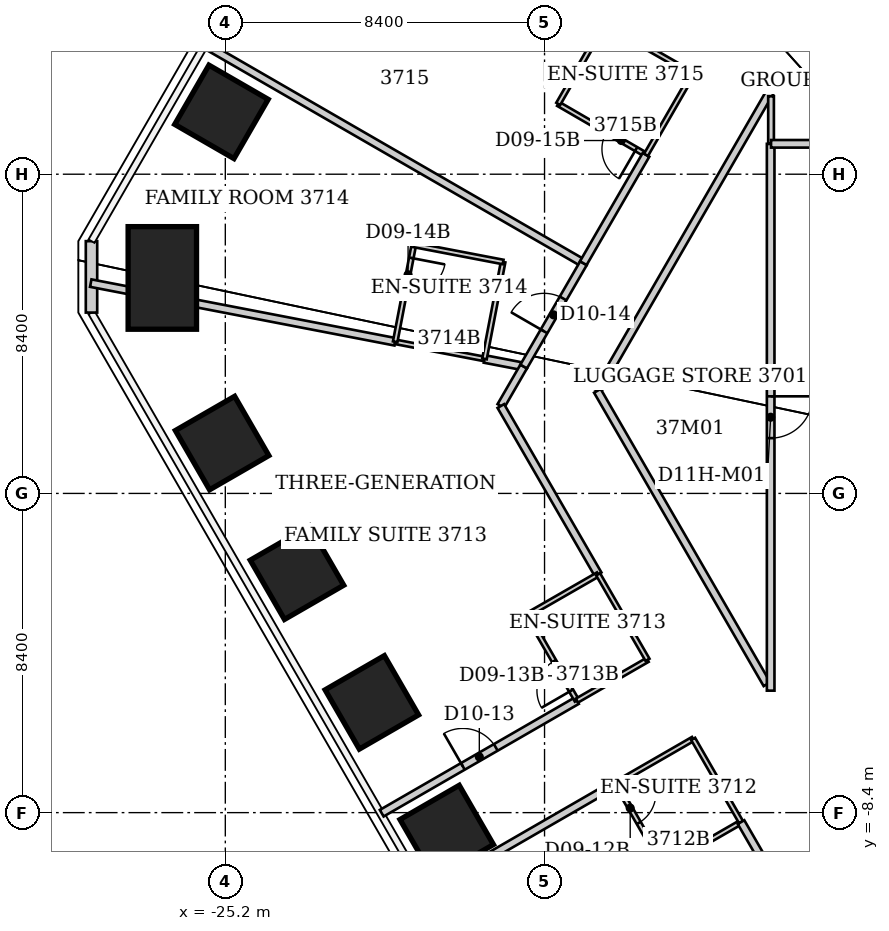
"""IFC4 building model, lengths in metres.
Left out: names, types, materials, properties, quantities, classifications, styles, units other than length and angle.
Written with IfcOpenShell. Run it as: python <this file> out.ifc"""

import sys

from ifc_helpers import new_model, si_unit, direction, frame, frame_2d, origin, origin_2d, place, context, subcontext, project, spatial, rectangle, extrude, element, fill, save


model = new_model("IFC4")
c1 = context("Model", 3, precision=1e-05, world=origin(), true_north=direction((0.0, 1.0)))
c2 = subcontext(c1, "Body", "Model", "MODEL_VIEW")
j1 = project(units=[si_unit("LENGTHUNIT", "METRE"), si_unit("PLANEANGLEUNIT", "RADIAN")], contexts=[c1])
p1 = place(None, origin())
s1 = spatial("IfcSite", under=j1, at=p1, CompositionType="ELEMENT")
p2 = place(p1, origin())
s2 = spatial("IfcBuilding", under=s1, at=p2, CompositionType="ELEMENT")
p3 = place(p2, frame((0.0, 0.0, 150.0)))
s3 = spatial("IfcBuildingStorey", under=s2, at=p3, CompositionType="ELEMENT", Elevation=150.0)
p4 = place(p3, frame((-19.374, -8.911, -0.046), z_axis=(0.043112264699, 0.019844321839, 0.998873132847), x_axis=(-0.864807493733, -0.499874783842, 0.047256737739)))
e1 = element("IfcColumn", 1, at=p4, inside=s3, PredefinedType="COLUMN", context=c2, shape_type="SweptSolid", body=[
    extrude(rectangle(XDim=1.8, YDim=1.8, at=origin_2d()), origin(), (0.0, 0.0, 1.0), 3.851),
])
p5 = place(p3, frame((-21.344, -5.499, -0.054), z_axis=(0.047510469933, 0.012273010875, 0.998795338621), x_axis=(-0.864419091597, -0.500544969808, 0.047269094371)))
e2 = element("IfcColumn", 2, at=p5, inside=s3, PredefinedType="COLUMN", context=c2, shape_type="SweptSolid", body=[
    extrude(rectangle(XDim=1.8, YDim=1.8, at=origin_2d()), origin(), (0.0, 0.0, 1.0), 3.859),
])
p6 = place(p3, frame((-23.314, -2.087, -0.062), z_axis=(0.051888980404, 0.004671270742, 0.9986419343), x_axis=(-0.864279894758, -0.500787073665, 0.047250083245)))
e3 = element("IfcColumn", 3, at=p6, inside=s3, PredefinedType="COLUMN", context=c2, shape_type="SweptSolid", body=[
    extrude(rectangle(XDim=1.8, YDim=1.8, at=origin_2d()), origin(), (0.0, 0.0, 1.0), 3.868),
])
p7 = place(p3, frame((-25.284, 1.325, -0.07), z_axis=(0.05624416487, -0.002960219204, 0.998412655679), x_axis=(-0.864437776769, -0.500518005639, 0.047212880923)))
e4 = element("IfcColumn", 4, at=p7, inside=s3, PredefinedType="COLUMN", context=c2, shape_type="SweptSolid", body=[
    extrude(rectangle(XDim=1.8, YDim=1.8, at=origin_2d()), origin(), (0.0, 0.0, 1.0), 3.876),
])
p8 = place(p3, frame((-26.857, 5.67, -0.071), z_axis=(0.060174697358, -0.012714737308, 0.998106878672), x_axis=(-0.998187848607, -0.000609086615, 0.060171819876)))
e5 = element("IfcColumn", 5, at=p8, inside=s3, PredefinedType="COLUMN", context=c2, shape_type="SweptSolid", body=[
    extrude(rectangle(XDim=1.8, YDim=2.7, at=origin_2d()), origin(), (0.0, 0.0, 1.0), 3.879),
])
p9 = place(p3, frame((-25.302, 10.041, -0.061), z_axis=(0.055421674634, -0.021966677417, 0.998221369769), x_axis=(-0.864472305627, 0.499208205688, 0.058981354491)))
e6 = element("IfcColumn", 6, at=p9, inside=s3, PredefinedType="COLUMN", context=c2, shape_type="SweptSolid", body=[
    extrude(rectangle(XDim=1.8, YDim=1.8, at=origin_2d()), origin(), (0.0, 0.0, 1.0), 3.868),
])
p10 = place(p3, frame((-28.721, 4.759, 0.0), z_axis=(0.0, 0.0, 1.0), x_axis=(0.0, 1.0, 0.0)))
e7 = element("IfcWall", 7, at=p10, inside=s3, PredefinedType="SOLIDWALL", context=c2, shape_type="SweptSolid", body=[
    extrude(rectangle(XDim=1.88, YDim=0.3, at=frame_2d((0.94, 0.0))), origin(), (0.0, 0.0, 1.0), 3.64),
])
p11 = place(p3, frame((-28.74, 5.534, 0.0), z_axis=(0.0, 0.0, 1.0), x_axis=(0.981916471091, -0.189314668743, 0.0)))
e8 = element("IfcWall", 8, at=p11, inside=s3, PredefinedType="PARTITIONING", context=c2, shape_type="SweptSolid", body=[
    extrude(rectangle(XDim=8.158, YDim=0.2, at=frame_2d((4.079, 0.0))), origin(), (0.0, 0.0, 1.0), 3.64),
])
p12 = place(p3, frame((-25.714, 11.795, 0.0), z_axis=(0.0, 0.0, 1.0), x_axis=(0.866045467449, -0.499965247104, 0.0)))
e9 = element("IfcWall", 9, at=p12, inside=s3, PredefinedType="PARTITIONING", context=c2, shape_type="SweptSolid", body=[
    extrude(rectangle(XDim=11.461, YDim=0.2, at=frame_2d((5.73, 0.0))), origin(), (0.0, 0.0, 1.0), 3.64),
])
p13 = place(p3, frame((-21.084, -8.415, 0.0), z_axis=(0.0, 0.0, 1.0), x_axis=(0.866185586049, 0.49972245349, 0.0)))
e10 = element("IfcWall", 10, at=p13, inside=s3, PredefinedType="PARTITIONING", context=c2, shape_type="SweptSolid", body=[
    extrude(rectangle(XDim=5.928, YDim=0.2, at=frame_2d((2.964, 0.0))), origin(), (0.0, 0.0, 1.0), 3.64),
])
p14 = place(p13, frame((2.464, 0.0, 0.0)))
e11 = element("IfcOpeningElement", 11, at=p14, cuts=e10, PredefinedType="OPENING", context=c2, shape_type="SweptSolid", body=[
    extrude(rectangle(XDim=1.0, YDim=2.13, at=frame_2d((0.5, 1.065))), frame((0.0, 0.1, 0.0), z_axis=(0.0, -1.0, 0.0), x_axis=(1.0, 0.0, 0.0)), (0.0, 0.0, 1.0), 0.2),
])
p15 = place(p3, frame((-20.73, 3.99, 0.0), z_axis=(0.0, 0.0, 1.0), x_axis=(0.982021000234, -0.188771701001, 0.0)))
e12 = element("IfcWall", 12, at=p15, inside=s3, PredefinedType="PARTITIONING", context=c2, shape_type="SweptSolid", body=[
    extrude(rectangle(XDim=2.393, YDim=0.12, at=frame_2d((1.196, 0.0))), origin(), (0.0, 0.0, 1.0), 3.64),
])
p16 = place(p3, frame((-20.24, 6.54, 0.0), z_axis=(0.0, 0.0, 1.0), x_axis=(-0.188697442844, -0.982035271802, 0.0)))
e13 = element("IfcWall", 13, at=p16, inside=s3, PredefinedType="PARTITIONING", context=c2, shape_type="SweptSolid", body=[
    extrude(rectangle(XDim=2.597, YDim=0.12, at=frame_2d((1.298, 0.0))), origin(), (0.0, 0.0, 1.0), 3.64),
])
p17 = place(p16, frame((0.35, 0.0, 0.0)))
e14 = element("IfcOpeningElement", 14, at=p17, cuts=e13, PredefinedType="OPENING", context=c2, shape_type="SweptSolid", body=[
    extrude(rectangle(XDim=0.9, YDim=2.03, at=frame_2d((0.45, 1.015))), frame((0.0, 0.06, 0.0), z_axis=(0.0, -1.0, 0.0), x_axis=(1.0, 0.0, 0.0)), (0.0, 0.0, 1.0), 0.12),
])
p18 = place(p3, frame((-19.884, -10.495, 0.0), z_axis=(0.0, 0.0, 1.0), x_axis=(0.86608558139, 0.499895754841, 0.0)))
e15 = element("IfcWall", 15, at=p18, inside=s3, PredefinedType="PARTITIONING", context=c2, shape_type="SweptSolid", body=[
    extrude(rectangle(XDim=5.732, YDim=0.2, at=frame_2d((2.866, 0.0))), origin(), (0.0, 0.0, 1.0), 3.64),
])
p19 = place(p3, frame((-18.38, 3.538, 0.0), z_axis=(0.0, 0.0, 1.0), x_axis=(0.981957872109, -0.189099808045, 0.0)))
e16 = element("IfcWall", 16, at=p19, inside=s3, PredefinedType="PARTITIONING", context=c2, shape_type="SweptSolid", body=[
    extrude(rectangle(XDim=1.004, YDim=0.2, at=frame_2d((0.502, 0.0))), origin(), (0.0, 0.0, 1.0), 3.64),
])
p20 = place(p3, frame((-18.38, 3.54, 0.0), z_axis=(0.0, 0.0, 1.0), x_axis=(0.188697442844, 0.982035271802, 0.0)))
e17 = element("IfcWall", 17, at=p20, inside=s3, PredefinedType="PARTITIONING", context=c2, shape_type="SweptSolid", body=[
    extrude(rectangle(XDim=2.597, YDim=0.12, at=frame_2d((1.298, 0.0))), origin(), (0.0, 0.0, 1.0), 3.64),
])
p21 = place(p3, frame((-17.95, 2.3, 0.0), z_axis=(0.0, 0.0, 1.0), x_axis=(0.500795801589, 0.865565459749, 0.0)))
e18 = element("IfcWall", 18, at=p21, inside=s3, PredefinedType="PARTITIONING", context=c2, shape_type="SweptSolid", body=[
    extrude(rectangle(XDim=1.201, YDim=0.2, at=frame_2d((0.6, 0.0))), origin(), (0.0, 0.0, 1.0), 3.64),
])
p22 = place(p3, frame((-17.95, 2.3, 0.0), z_axis=(0.0, 0.0, 1.0), x_axis=(0.500336423072, -0.865831082687, 0.0)))
e19 = element("IfcWall", 19, at=p22, inside=s3, PredefinedType="PARTITIONING", context=c2, shape_type="SweptSolid", body=[
    extrude(rectangle(XDim=5.117, YDim=0.2, at=frame_2d((2.558, 0.0))), origin(), (0.0, 0.0, 1.0), 3.64),
])
p23 = place(p3, frame((-17.89, 6.09, 0.0), z_axis=(0.0, 0.0, 1.0), x_axis=(-0.982160404505, 0.18804504732, 0.0)))
e20 = element("IfcWall", 20, at=p23, inside=s3, PredefinedType="PARTITIONING", context=c2, shape_type="SweptSolid", body=[
    extrude(rectangle(XDim=2.393, YDim=0.12, at=frame_2d((1.196, 0.0))), origin(), (0.0, 0.0, 1.0), 3.64),
])
p24 = place(p3, frame((-17.349, 3.339, 0.0), z_axis=(0.0, 0.0, 1.0), x_axis=(0.500803353914, 0.865561090108, 0.0)))
e21 = element("IfcWall", 21, at=p24, inside=s3, PredefinedType="PARTITIONING", context=c2, shape_type="SweptSolid", body=[
    extrude(rectangle(XDim=3.14, YDim=0.2, at=frame_2d((1.57, 0.0))), origin(), (0.0, 0.0, 1.0), 3.64),
])
p25 = place(p24, frame((1.07, 0.0, 0.0)))
e22 = element("IfcOpeningElement", 22, at=p25, cuts=e21, PredefinedType="OPENING", context=c2, shape_type="SweptSolid", body=[
    extrude(rectangle(XDim=1.0, YDim=2.13, at=frame_2d((0.5, 1.065))), frame((0.0, 0.1, 0.0), z_axis=(0.0, -1.0, 0.0), x_axis=(1.0, 0.0, 0.0)), (0.0, 0.0, 1.0), 0.2),
])
p26 = place(p3, frame((-17.25, -3.2, 0.0), z_axis=(0.0, 0.0, 1.0), x_axis=(0.500291685314, -0.865856933682, 0.0)))
e23 = element("IfcWall", 23, at=p26, inside=s3, PredefinedType="PARTITIONING", context=c2, shape_type="SweptSolid", body=[
    extrude(rectangle(XDim=2.599, YDim=0.12, at=frame_2d((1.299, 0.0))), origin(), (0.0, 0.0, 1.0), 3.64),
])
p27 = place(p26, frame((1.399, 0.0, 0.0)))
e24 = element("IfcOpeningElement", 24, at=p27, cuts=e23, PredefinedType="OPENING", context=c2, shape_type="SweptSolid", body=[
    extrude(rectangle(XDim=0.9, YDim=2.03, at=frame_2d((0.45, 1.015))), frame((0.0, 0.06, 0.0), z_axis=(0.0, -1.0, 0.0), x_axis=(1.0, 0.0, 0.0)), (0.0, 0.0, 1.0), 0.12),
])
p28 = place(p3, frame((-16.44, 10.25, 0.0), z_axis=(0.0, 0.0, 1.0), x_axis=(0.864966903181, -0.501828911485, 0.0)))
e25 = element("IfcWall", 25, at=p28, inside=s3, PredefinedType="PARTITIONING", context=c2, shape_type="SweptSolid", body=[
    extrude(rectangle(XDim=2.67, YDim=0.12, at=frame_2d((1.335, 0.0))), origin(), (0.0, 0.0, 1.0), 3.64),
])
p29 = place(p28, frame((1.47, 0.0, 0.0)))
e26 = element("IfcOpeningElement", 26, at=p29, cuts=e25, PredefinedType="OPENING", context=c2, shape_type="SweptSolid", body=[
    extrude(rectangle(XDim=0.9, YDim=2.03, at=frame_2d((0.45, 1.015))), frame((0.0, 0.06, 0.0), z_axis=(0.0, -1.0, 0.0), x_axis=(1.0, 0.0, 0.0)), (0.0, 0.0, 1.0), 0.12),
])
p30 = place(p3, frame((-15.949, -5.452, 0.0), z_axis=(0.0, 0.0, 1.0), x_axis=(0.866142018774, 0.499797962495, 0.0)))
e27 = element("IfcWall", 27, at=p30, inside=s3, PredefinedType="PARTITIONING", context=c2, shape_type="SweptSolid", body=[
    extrude(rectangle(XDim=2.146, YDim=0.12, at=frame_2d((1.073, 0.0))), origin(), (0.0, 0.0, 1.0), 3.64),
])
p31 = place(p3, frame((-15.78, 6.06, 0.0), z_axis=(0.0, 0.0, 1.0), x_axis=(0.501088872721, 0.865395829453, 0.0)))
e28 = element("IfcWall", 28, at=p31, inside=s3, PredefinedType="PARTITIONING", context=c2, shape_type="SweptSolid", body=[
    extrude(rectangle(XDim=3.293, YDim=0.2, at=frame_2d((1.646, 0.0))), origin(), (0.0, 0.0, 1.0), 3.64),
])
p32 = place(p3, frame((-15.41, 2.7, 0.0), z_axis=(0.0, 0.0, 1.0), x_axis=(0.500237524763, 0.865888225361, 0.0)))
e29 = element("IfcWall", 29, at=p32, inside=s3, PredefinedType="PARTITIONING", context=c2, shape_type="SweptSolid", body=[
    extrude(rectangle(XDim=9.135, YDim=0.2, at=frame_2d((4.568, 0.0))), origin(), (0.0, 0.0, 1.0), 3.64),
])
p33 = place(p3, frame((-15.39, -2.13, 0.0), z_axis=(0.0, 0.0, 1.0), x_axis=(-0.866804272416, -0.498648526841, 0.0)))
e30 = element("IfcWall", 30, at=p33, inside=s3, PredefinedType="PARTITIONING", context=c2, shape_type="SweptSolid", body=[
    extrude(rectangle(XDim=2.146, YDim=0.12, at=frame_2d((1.073, 0.0))), origin(), (0.0, 0.0, 1.0), 2.878),
])
p34 = place(p3, frame((-15.39, -2.13, 0.0), z_axis=(0.0, 0.0, 1.0), x_axis=(0.500180550803, -0.865921137632, 0.0)))
e31 = element("IfcWall", 31, at=p34, inside=s3, PredefinedType="PARTITIONING", context=c2, shape_type="SweptSolid", body=[
    extrude(rectangle(XDim=2.599, YDim=0.12, at=frame_2d((1.299, 0.0))), origin(), (0.0, 0.0, 1.0), 3.64),
])
p35 = place(p3, frame((-15.22, 12.37, 0.0), z_axis=(0.0, 0.0, 1.0), x_axis=(-0.498748634132, -0.866746675766, 0.0)))
e32 = element("IfcWall", 32, at=p35, inside=s3, PredefinedType="PARTITIONING", context=c2, shape_type="SweptSolid", body=[
    extrude(rectangle(XDim=2.446, YDim=0.12, at=frame_2d((1.223, 0.0))), origin(), (0.0, 0.0, 1.0), 3.64),
])
p36 = place(p3, frame((-15.22, 12.37, 0.0), z_axis=(0.0, 0.0, 1.0), x_axis=(0.867545659855, -0.497357545501, 0.0)))
e33 = element("IfcWall", 33, at=p36, inside=s3, PredefinedType="PARTITIONING", context=c2, shape_type="SweptSolid", body=[
    extrude(rectangle(XDim=2.674, YDim=0.12, at=frame_2d((1.337, 0.0))), origin(), (0.0, 0.0, 1.0), 3.64),
])
p37 = place(p3, frame((-14.92, -7.63, 0.0), z_axis=(0.0, 0.0, 1.0), x_axis=(0.498665353881, -0.866794592068, 0.0)))
e34 = element("IfcWall", 34, at=p37, inside=s3, PredefinedType="PARTITIONING", context=c2, shape_type="SweptSolid", body=[
    extrude(rectangle(XDim=2.527, YDim=0.12, at=frame_2d((1.263, 0.0))), origin(), (0.0, 0.0, 1.0), 3.64),
])
p38 = place(p37, frame((0.3, 0.0, 0.0)))
e35 = element("IfcOpeningElement", 35, at=p38, cuts=e34, PredefinedType="OPENING", context=c2, shape_type="SweptSolid", body=[
    extrude(rectangle(XDim=0.9, YDim=2.03, at=frame_2d((0.45, 1.015))), frame((0.0, 0.06, 0.0), z_axis=(0.0, -1.0, 0.0), x_axis=(1.0, 0.0, 0.0)), (0.0, 0.0, 1.0), 0.12),
])
p39 = place(p3, frame((-14.92, -7.63, 0.0), z_axis=(0.0, 0.0, 1.0), x_axis=(0.866390229467, 0.499367570316, 0.0)))
e36 = element("IfcWall", 36, at=p39, inside=s3, PredefinedType="PARTITIONING", context=c2, shape_type="SweptSolid", body=[
    extrude(rectangle(XDim=2.343, YDim=0.12, at=frame_2d((1.171, 0.0))), origin(), (0.0, 0.0, 1.0), 3.64),
])
p40 = place(p3, frame((-14.13, 8.91, 0.0), z_axis=(0.0, 0.0, 1.0), x_axis=(0.500046071023, 0.865998803033, 0.0)))
e37 = element("IfcWall", 37, at=p40, inside=s3, PredefinedType="PARTITIONING", context=c2, shape_type="SweptSolid", body=[
    extrude(rectangle(XDim=2.46, YDim=0.12, at=frame_2d((1.23, 0.0))), origin(), (0.0, 0.0, 1.0), 3.64),
])
p41 = place(p3, frame((-13.66, -9.82, 0.0), z_axis=(0.0, 0.0, 1.0), x_axis=(0.866345142729, 0.499445786517, 0.0)))
e38 = element("IfcWall", 38, at=p41, inside=s3, PredefinedType="PARTITIONING", context=c2, shape_type="SweptSolid", body=[
    extrude(rectangle(XDim=2.343, YDim=0.12, at=frame_2d((1.171, 0.0))), origin(), (0.0, 0.0, 1.0), 3.64),
])
p42 = place(p3, frame((-12.89, -6.46, 0.0), z_axis=(0.0, 0.0, 1.0), x_axis=(0.498707120669, -0.866770562372, 0.0)))
e39 = element("IfcWall", 39, at=p42, inside=s3, PredefinedType="PARTITIONING", context=c2, shape_type="SweptSolid", body=[
    extrude(rectangle(XDim=2.527, YDim=0.12, at=frame_2d((1.263, 0.0))), origin(), (0.0, 0.0, 1.0), 3.64),
])
p43 = place(p3, frame((-11.63, -8.65, 0.0), z_axis=(0.0, 0.0, 1.0), x_axis=(0.500367528775, -0.865813106939, 0.0)))
e40 = element("IfcWall", 40, at=p43, inside=s3, PredefinedType="PARTITIONING", context=c2, shape_type="SweptSolid", body=[
    extrude(rectangle(XDim=8.593, YDim=0.2, at=frame_2d((4.297, 0.0))), origin(), (0.0, 0.0, 1.0), 3.64),
])
p44 = place(p43, frame((3.797, 0.0, 0.0)))
e41 = element("IfcOpeningElement", 41, at=p44, cuts=e40, PredefinedType="OPENING", context=c2, shape_type="SweptSolid", body=[
    extrude(rectangle(XDim=1.0, YDim=2.13, at=frame_2d((0.5, 1.065))), frame((0.0, 0.1, 0.0), z_axis=(0.0, -1.0, 0.0), x_axis=(1.0, 0.0, 0.0)), (0.0, 0.0, 1.0), 0.2),
])
p45 = place(p3, frame((-10.948, -5.021, 0.0), z_axis=(0.0, 0.0, 1.0), x_axis=(-0.500384322182, 0.865803401538, 0.0)))
e42 = element("IfcWall", 42, at=p45, inside=s3, PredefinedType="PARTITIONING", context=c2, shape_type="SweptSolid", body=[
    extrude(rectangle(XDim=8.918, YDim=0.2, at=frame_2d((4.459, 0.0))), origin(), (0.0, 0.0, 1.0), 3.64),
])
p46 = place(p3, frame((-10.85, 9.2, 0.0), z_axis=(0.0, 0.0, 1.0), x_axis=(0.0, -1.0, 0.0)))
e43 = element("IfcWall", 43, at=p46, inside=s3, PredefinedType="PARTITIONING", context=c2, shape_type="SweptSolid", body=[
    extrude(rectangle(XDim=14.39, YDim=0.2, at=frame_2d((7.195, 0.0))), origin(), (0.0, 0.0, 1.0), 3.64),
])
p47 = place(p46, frame((6.645, 0.0, 0.0)))
e44 = element("IfcOpeningElement", 44, at=p47, cuts=e43, PredefinedType="OPENING", context=c2, shape_type="SweptSolid", body=[
    extrude(rectangle(XDim=1.1, YDim=2.2, at=frame_2d((0.55, 1.1))), frame((0.0, 0.1, 0.0), z_axis=(0.0, -1.0, 0.0), x_axis=(1.0, 0.0, 0.0)), (0.0, 0.0, 1.0), 0.2),
])
p48 = place(p3, frame((-10.84, 10.45, 0.0), z_axis=(0.0, 0.0, 1.0), x_axis=(0.0, -1.0, 0.0)))
e45 = element("IfcWall", 45, at=p48, inside=s3, PredefinedType="PARTITIONING", context=c2, shape_type="SweptSolid", body=[
    extrude(rectangle(XDim=1.25, YDim=0.15, at=frame_2d((0.625, 0.0))), origin(), (0.0, 0.0, 1.0), 3.64),
])
p49 = place(p3, frame((-10.84, 10.61, 0.0), z_axis=(0.0, 0.0, 1.0), x_axis=(0.501518373175, 0.865146994081, 0.0)))
e46 = element("IfcWall", 46, at=p49, inside=s3, PredefinedType="PARTITIONING", context=c2, shape_type="SweptSolid", body=[
    extrude(rectangle(XDim=0.439, YDim=0.2, at=frame_2d((0.22, 0.0))), origin(), (0.0, 0.0, 1.0), 3.64),
])
p50 = place(p3, frame((-10.62, 10.99, 0.0), z_axis=(0.0, 0.0, 1.0), x_axis=(1.0, 0.0, 0.0)))
e47 = element("IfcWall", 47, at=p50, inside=s3, PredefinedType="PARTITIONING", context=c2, shape_type="SweptSolid", body=[
    extrude(rectangle(XDim=4.35, YDim=0.2, at=frame_2d((2.175, 0.0))), origin(), (0.0, 0.0, 1.0), 3.64),
])
p51 = place(p3, frame((-6.27, 9.2, 0.0), z_axis=(0.0, 0.0, 1.0), x_axis=(-1.0, 0.0, 0.0)))
e48 = element("IfcWall", 48, at=p51, inside=s3, PredefinedType="PARTITIONING", context=c2, shape_type="SweptSolid", body=[
    extrude(rectangle(XDim=4.57, YDim=0.2, at=frame_2d((2.285, 0.0))), origin(), (0.0, 0.0, 1.0), 3.64),
])
p52 = place(p51, frame((1.735, 0.0, 0.0)))
e49 = element("IfcOpeningElement", 49, at=p52, cuts=e48, PredefinedType="OPENING", context=c2, shape_type="SweptSolid", body=[
    extrude(rectangle(XDim=1.1, YDim=2.2, at=frame_2d((0.55, 1.1))), frame((0.0, 0.1, 0.0), z_axis=(0.0, -1.0, 0.0), x_axis=(1.0, 0.0, 0.0)), (0.0, 0.0, 1.0), 0.2),
])
p53 = place(p38, origin())
e50 = element("IfcDoor", 50, at=p53, inside=s3, OperationType="SINGLE_SWING_LEFT", PredefinedType="DOOR", context=c2, shape_type="SweptSolid", body=[
    extrude(rectangle(XDim=0.9, YDim=2.03, at=frame_2d((0.45, 1.015))), frame((0.0, 0.025, 0.0), z_axis=(0.0, -1.0, 0.0), x_axis=(1.0, 0.0, 0.0)), (0.0, 0.0, 1.0), 0.05),
])
fill(e35, e50)
p54 = place(p14, origin())
e51 = element("IfcDoor", 51, at=p54, inside=s3, OperationType="SINGLE_SWING_LEFT", PredefinedType="DOOR", context=c2, shape_type="SweptSolid", body=[
    extrude(rectangle(XDim=1.0, YDim=2.13, at=frame_2d((0.5, 1.065))), frame((0.0, 0.025, 0.0), z_axis=(0.0, -1.0, 0.0), x_axis=(1.0, 0.0, 0.0)), (0.0, 0.0, 1.0), 0.05),
])
fill(e11, e51)
p55 = place(p27, origin())
e52 = element("IfcDoor", 52, at=p55, inside=s3, OperationType="SINGLE_SWING_RIGHT", PredefinedType="DOOR", context=c2, shape_type="SweptSolid", body=[
    extrude(rectangle(XDim=0.9, YDim=2.03, at=frame_2d((0.45, 1.015))), frame((0.0, 0.025, 0.0), z_axis=(0.0, -1.0, 0.0), x_axis=(1.0, 0.0, 0.0)), (0.0, 0.0, 1.0), 0.05),
])
fill(e24, e52)
p56 = place(p25, origin())
e53 = element("IfcDoor", 53, at=p56, inside=s3, OperationType="SINGLE_SWING_LEFT", PredefinedType="DOOR", context=c2, shape_type="SweptSolid", body=[
    extrude(rectangle(XDim=1.0, YDim=2.13, at=frame_2d((0.5, 1.065))), frame((0.0, 0.025, 0.0), z_axis=(0.0, -1.0, 0.0), x_axis=(1.0, 0.0, 0.0)), (0.0, 0.0, 1.0), 0.05),
])
fill(e22, e53)
p57 = place(p17, origin())
e54 = element("IfcDoor", 54, at=p57, inside=s3, OperationType="SINGLE_SWING_LEFT", PredefinedType="DOOR", context=c2, shape_type="SweptSolid", body=[
    extrude(rectangle(XDim=0.9, YDim=2.03, at=frame_2d((0.45, 1.015))), frame((0.0, 0.025, 0.0), z_axis=(0.0, -1.0, 0.0), x_axis=(1.0, 0.0, 0.0)), (0.0, 0.0, 1.0), 0.05),
])
fill(e14, e54)
p58 = place(p29, origin())
e55 = element("IfcDoor", 55, at=p58, inside=s3, OperationType="SINGLE_SWING_RIGHT", PredefinedType="DOOR", context=c2, shape_type="SweptSolid", body=[
    extrude(rectangle(XDim=0.9, YDim=2.03, at=frame_2d((0.45, 1.015))), frame((0.0, 0.025, 0.0), z_axis=(0.0, -1.0, 0.0), x_axis=(1.0, 0.0, 0.0)), (0.0, 0.0, 1.0), 0.05),
])
fill(e26, e55)
p59 = place(p47, origin())
e56 = element("IfcDoor", 56, at=p59, inside=s3, OperationType="SINGLE_SWING_LEFT", PredefinedType="DOOR", context=c2, shape_type="SweptSolid", body=[
    extrude(rectangle(XDim=1.1, YDim=2.2, at=frame_2d((0.55, 1.1))), frame((0.0, 0.025, 0.0), z_axis=(0.0, -1.0, 0.0), x_axis=(1.0, 0.0, 0.0)), (0.0, 0.0, 1.0), 0.05),
])
fill(e44, e56)
save(model, sys.argv[1])
